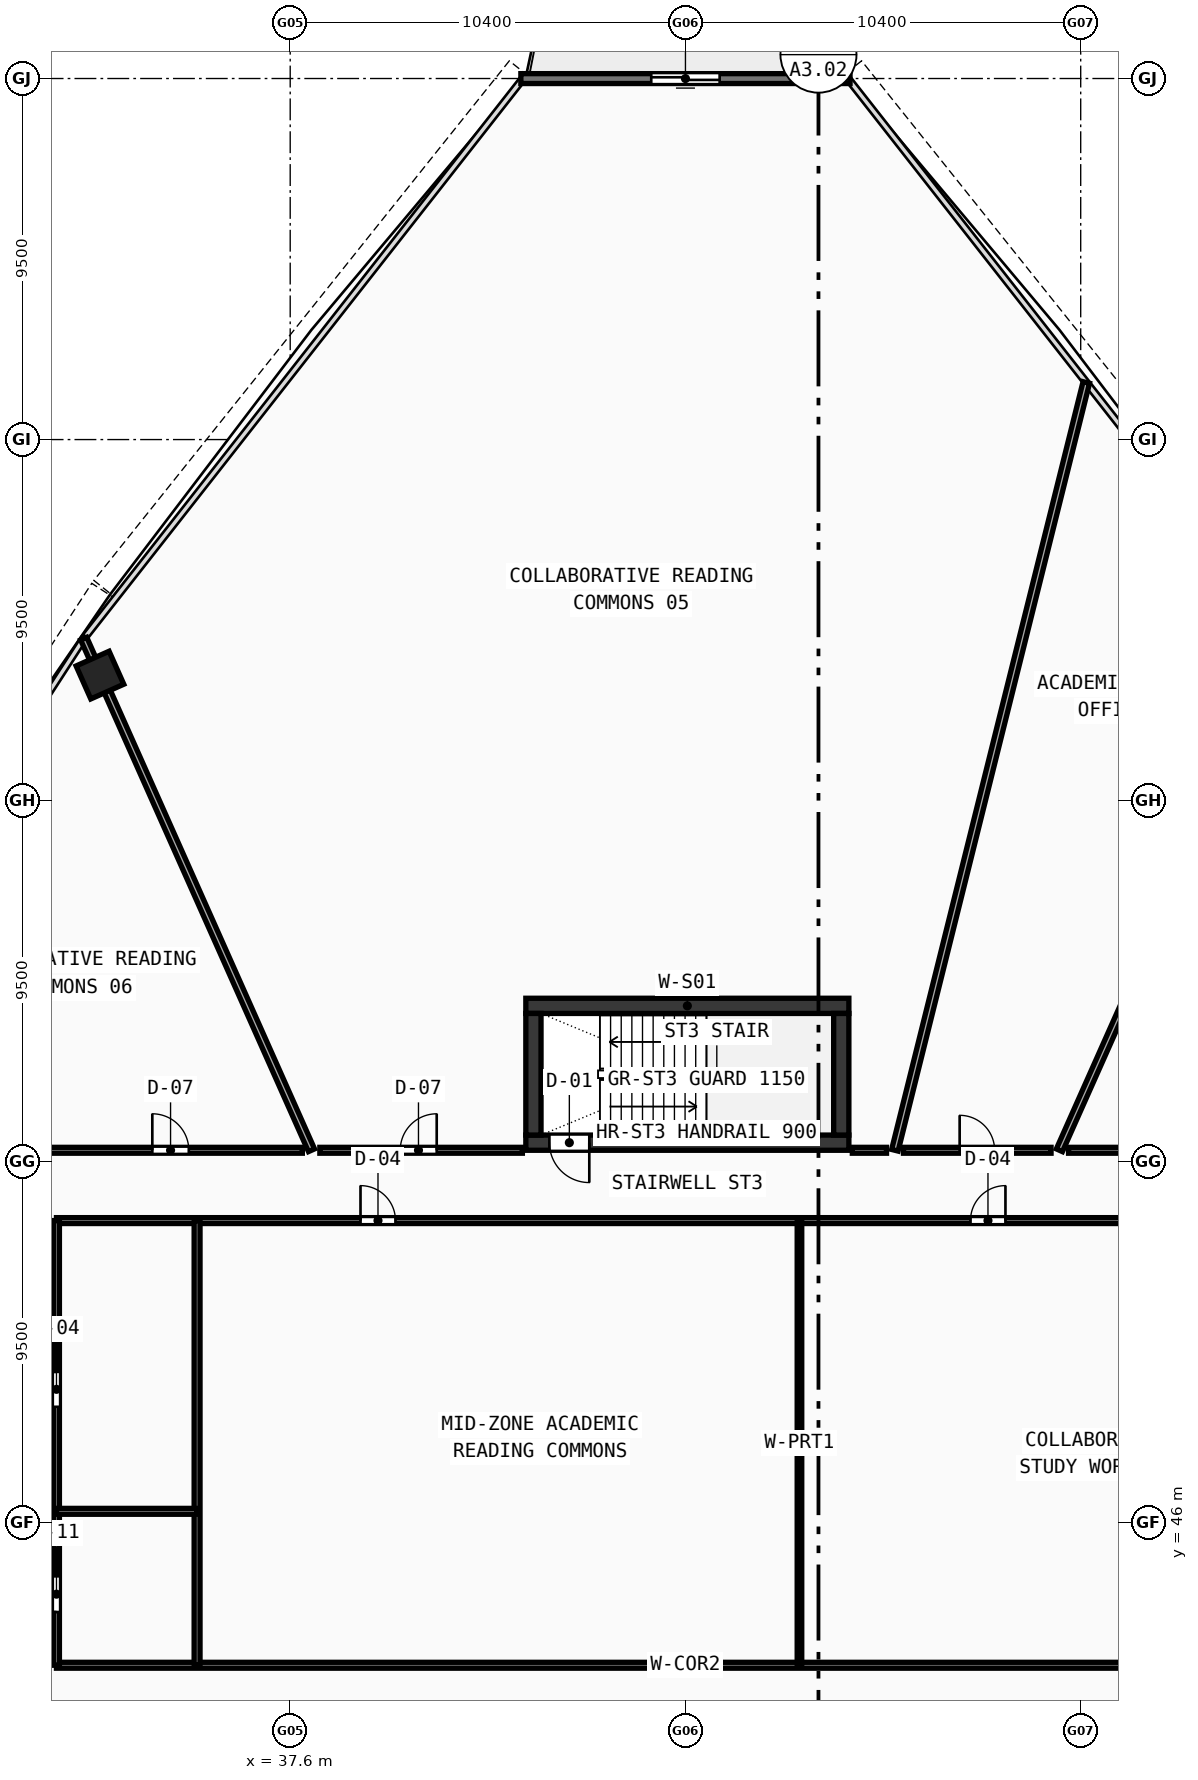
"""IFC4 building model, lengths in metres.
Left out: names, types, materials, properties, quantities, classifications, styles, units other than length and angle.
Written with IfcOpenShell. Run it as: python <this file> out.ifc"""

import sys

from ifc_helpers import new_model, si_unit, direction, frame, frame_2d, origin, origin_with_axes, origin_2d, place, context, subcontext, project, spatial, rectangle, hollow_rectangle, extrude, source, transform, mapped, element, fill, save


model = new_model("IFC4")
c1 = context("Model", 3, precision=1e-05, world=origin(), true_north=direction((0.0, 1.0)))
c2 = subcontext(c1, "Body", "Model", "MODEL_VIEW")
j1 = project(units=[si_unit("LENGTHUNIT", "METRE"), si_unit("PLANEANGLEUNIT", "RADIAN")], contexts=[c1])
p1 = place(None, origin())
s1 = spatial("IfcSite", under=j1, at=p1, CompositionType="ELEMENT")
p2 = place(p1, origin())
s2 = spatial("IfcBuilding", under=s1, at=p2, CompositionType="ELEMENT")
p3 = place(p2, frame((0.0, 0.0, 162.95)))
s3 = spatial("IfcBuildingStorey", under=s2, at=p3, CompositionType="ELEMENT", Elevation=162.95)
p4 = place(p3, frame((43.8, 59.6, 0.0), z_axis=(0.0, 0.0, 1.0), x_axis=(1.0, 0.0, 0.0)))
e1 = element("IfcWall", 1, at=p4, inside=s3, PredefinedType="SHEAR", context=c2, shape_type="SweptSolid", body=[
    extrude(rectangle(XDim=8.5, YDim=0.4, at=frame_2d((4.25, 0.0))), origin(), (0.0, 0.0, 1.0), 3.42),
])
p5 = place(p3, frame((43.8, 56.0, 0.0), z_axis=(0.0, 0.0, 1.0), x_axis=(1.0, 0.0, 0.0)))
e2 = element("IfcWall", 2, at=p5, inside=s3, PredefinedType="SHEAR", context=c2, shape_type="SweptSolid", body=[
    extrude(rectangle(XDim=8.5, YDim=0.4, at=frame_2d((4.25, 0.0))), origin(), (0.0, 0.0, 1.0), 3.42),
])
p6 = place(p5, frame((0.62, 0.0, 0.0)))
e3 = element("IfcOpeningElement", 3, at=p6, cuts=e2, PredefinedType="OPENING", context=c2, shape_type="SweptSolid", body=[
    extrude(rectangle(XDim=1.05, YDim=2.1, at=frame_2d((0.525, 1.05))), frame((0.0, 0.21, 0.0), z_axis=(0.0, -1.0, 0.0), x_axis=(1.0, 0.0, 0.0)), (0.0, 0.0, 1.0), 0.42),
])
for number, where, z_axis, x_axis in (
    (4, (44.0, 56.2, 0.0), (0.0, 0.0, 1.0), (0.0, 1.0, 0.0)),
    (5, (52.1, 56.2, 0.0), (0.0, 0.0, 1.0), (0.0, 1.0, 0.0)),
):
    element("IfcWall", number, at=place(p3, frame(where, z_axis=z_axis, x_axis=x_axis)), inside=s3, PredefinedType="SHEAR", context=c2, shape_type="SweptSolid", body=[
        extrude(rectangle(XDim=3.2, YDim=0.4, at=frame_2d((1.6, 0.0))), origin(), (0.0, 0.0, 1.0), 3.42),
    ])
m1 = source(origin(), c2, "Body", "SweptSolid", [
    extrude(hollow_rectangle(XDim=0.95, YDim=0.95, WallThickness=0.04, at=origin_2d()), origin(), (0.0, 0.0, 1.0), 3.68),
])
p7 = place(p3, frame((32.594, 68.303, -0.26), z_axis=(0.0, 0.0, 1.0), x_axis=(-0.913545457643, -0.406736643076, 0.0)))
e6 = element("IfcColumn", 6, at=p7, inside=s3, PredefinedType="COLUMN", context=c2, shape_type="MappedRepresentation", body=[
    mapped(m1, transform((0.0, 0.0, 0.0), scale=1.0)),
])
p8 = place(p3, frame((52.331, 83.998, 0.0), z_axis=(0.0, 0.0, 1.0), x_axis=(-1.0, 0.0, 0.0)))
e7 = element("IfcWall", 7, at=p8, inside=s3, PredefinedType="STANDARD", context=c2, shape_type="SweptSolid", body=[
    extrude(rectangle(XDim=8.661, YDim=0.26, at=frame_2d((4.331, 0.0))), origin(), (0.0, 0.0, 1.0), 3.42),
])
p9 = place(p8, frame((3.431, 0.0, 0.0)))
e8 = element("IfcOpeningElement", 8, at=p9, cuts=e7, PredefinedType="OPENING", context=c2, shape_type="SweptSolid", body=[
    extrude(rectangle(XDim=1.8, YDim=2.15, at=frame_2d((0.9, 1.075))), frame((0.0, 0.14, 0.0), z_axis=(0.0, -1.0, 0.0), x_axis=(1.0, 0.0, 0.0)), (0.0, 0.0, 1.0), 0.28),
])
p10 = place(p3, frame((31.45, 42.25, 0.0), z_axis=(0.0, 0.0, 1.0), x_axis=(1.0, 0.0, 0.0)))
e9 = element("IfcWall", 9, at=p10, inside=s3, PredefinedType="PARTITIONING", context=c2, shape_type="SweptSolid", body=[
    extrude(rectangle(XDim=33.1, YDim=0.155, at=frame_2d((16.55, 0.0))), origin(), (0.0, 0.0, 1.0), 2.77),
])
p11 = place(p3, frame((31.45, 53.95, 0.0), z_axis=(0.0, 0.0, 1.0), x_axis=(1.0, 0.0, 0.0)))
e10 = element("IfcWall", 10, at=p11, inside=s3, PredefinedType="PARTITIONING", context=c2, shape_type="SweptSolid", body=[
    extrude(rectangle(XDim=33.1, YDim=0.155, at=frame_2d((16.55, 0.0))), origin(), (0.0, 0.0, 1.0), 2.77),
])
p12 = place(p11, frame((8.0, 0.0, 0.0)))
e11 = element("IfcOpeningElement", 11, at=p12, cuts=e10, PredefinedType="OPENING", context=c2, shape_type="SweptSolid", body=[
    extrude(rectangle(XDim=0.92, YDim=2.1, at=frame_2d((0.46, 1.05))), frame((0.0, 0.087, 0.0), z_axis=(0.0, -1.0, 0.0), x_axis=(1.0, 0.0, 0.0)), (0.0, 0.0, 1.0), 0.175),
])
p13 = place(p11, frame((24.05, 0.0, 0.0)))
e12 = element("IfcOpeningElement", 12, at=p13, cuts=e10, PredefinedType="OPENING", context=c2, shape_type="SweptSolid", body=[
    extrude(rectangle(XDim=0.92, YDim=2.1, at=frame_2d((0.46, 1.05))), frame((0.0, 0.087, 0.0), z_axis=(0.0, -1.0, 0.0), x_axis=(1.0, 0.0, 0.0)), (0.0, 0.0, 1.0), 0.175),
])
p14 = place(p3, frame((31.45, 42.25, 0.0), z_axis=(0.0, 0.0, 1.0), x_axis=(0.0, 1.0, 0.0)))
e13 = element("IfcWall", 13, at=p14, inside=s3, PredefinedType="PARTITIONING", context=c2, shape_type="SweptSolid", body=[
    extrude(rectangle(XDim=11.7, YDim=0.155, at=frame_2d((5.85, 0.0))), origin(), (0.0, 0.0, 1.0), 2.77),
])
p15 = place(p14, frame((1.4, 0.0, 0.0)))
e14 = element("IfcOpeningElement", 14, at=p15, cuts=e13, PredefinedType="OPENING", context=c2, shape_type="SweptSolid", body=[
    extrude(rectangle(XDim=0.94, YDim=2.1, at=frame_2d((0.47, 1.05))), frame((0.0, 0.087, 0.0), z_axis=(0.0, -1.0, 0.0), x_axis=(1.0, 0.0, 0.0)), (0.0, 0.0, 1.0), 0.175),
])
p16 = place(p14, frame((6.8, 0.0, 0.0)))
e15 = element("IfcOpeningElement", 15, at=p16, cuts=e13, PredefinedType="OPENING", context=c2, shape_type="SweptSolid", body=[
    extrude(rectangle(XDim=0.92, YDim=2.1, at=frame_2d((0.46, 1.05))), frame((0.0, 0.087, 0.0), z_axis=(0.0, -1.0, 0.0), x_axis=(1.0, 0.0, 0.0)), (0.0, 0.0, 1.0), 0.175),
])
p17 = place(p3, frame((35.15, 42.25, 0.0), z_axis=(0.0, 0.0, 1.0), x_axis=(0.0, 1.0, 0.0)))
e16 = element("IfcWall", 16, at=p17, inside=s3, PredefinedType="PARTITIONING", context=c2, shape_type="SweptSolid", body=[
    extrude(rectangle(XDim=11.7, YDim=0.155, at=frame_2d((5.85, 0.0))), origin(), (0.0, 0.0, 1.0), 2.77),
])
p18 = place(p3, frame((31.45, 46.3, 0.0), z_axis=(0.0, 0.0, 1.0), x_axis=(1.0, 0.0, 0.0)))
e17 = element("IfcWall", 17, at=p18, inside=s3, PredefinedType="PARTITIONING", context=c2, shape_type="SweptSolid", body=[
    extrude(rectangle(XDim=3.7, YDim=0.155, at=frame_2d((1.85, 0.0))), origin(), (0.0, 0.0, 1.0), 2.77),
])
p19 = place(p3, frame((51.0, 42.25, 0.0), z_axis=(0.0, 0.0, 1.0), x_axis=(0.0, 1.0, 0.0)))
e18 = element("IfcWall", 18, at=p19, inside=s3, PredefinedType="PARTITIONING", context=c2, shape_type="SweptSolid", body=[
    extrude(rectangle(XDim=11.7, YDim=0.12, at=frame_2d((5.85, 0.0))), origin(), (0.0, 0.0, 1.0), 3.02),
])
p20 = place(p3, frame((57.84, 55.8, 0.0), z_axis=(0.0, 0.0, 1.0), x_axis=(0.406737891531, 0.913544901793, 0.0)))
e19 = element("IfcWall", 19, at=p20, inside=s3, PredefinedType="PARTITIONING", context=c2, shape_type="SweptSolid", body=[
    extrude(rectangle(XDim=14.736, YDim=0.175, at=frame_2d((7.368, 0.0))), origin(), (0.0, 0.0, 1.0), 2.77),
])
p21 = place(p3, frame((53.51, 55.8, 0.0), z_axis=(0.0, 0.0, 1.0), x_axis=(0.241934095485, 0.970292684422, 0.0)))
e20 = element("IfcWall", 20, at=p21, inside=s3, PredefinedType="PARTITIONING", context=c2, shape_type="SweptSolid", body=[
    extrude(rectangle(XDim=20.82, YDim=0.175, at=frame_2d((10.41, 0.0))), origin(), (0.0, 0.0, 1.0), 2.77),
])
p22 = place(p3, frame((38.16, 55.8, 0.0), z_axis=(0.0, 0.0, 1.0), x_axis=(-0.406737891531, 0.913544901793, 0.0)))
e21 = element("IfcWall", 21, at=p22, inside=s3, PredefinedType="PARTITIONING", context=c2, shape_type="SweptSolid", body=[
    extrude(rectangle(XDim=14.736, YDim=0.175, at=frame_2d((7.368, 0.0))), origin(), (0.0, 0.0, 1.0), 2.77),
])
p23 = place(p3, frame((30.953, 55.8, 0.0), z_axis=(0.0, 0.0, 1.0), x_axis=(1.0, 0.0, 0.0)))
e22 = element("IfcWall", 22, at=p23, inside=s3, PredefinedType="PARTITIONING", context=c2, shape_type="SweptSolid", body=[
    extrude(rectangle(XDim=6.966, YDim=0.155, at=frame_2d((3.483, 0.0))), origin(), (0.0, 0.0, 1.0), 3.02),
])
p24 = place(p23, frame((3.019, 0.0, 0.0)))
e23 = element("IfcOpeningElement", 23, at=p24, cuts=e22, PredefinedType="OPENING", context=c2, shape_type="SweptSolid", body=[
    extrude(rectangle(XDim=0.96, YDim=2.12, at=frame_2d((0.48, 1.06))), frame((0.0, 0.087, 0.0), z_axis=(0.0, -1.0, 0.0), x_axis=(1.0, 0.0, 0.0)), (0.0, 0.0, 1.0), 0.175),
])
p25 = place(p3, frame((38.38, 55.8, 0.0), z_axis=(0.0, 0.0, 1.0), x_axis=(1.0, 0.0, 0.0)))
e24 = element("IfcWall", 24, at=p25, inside=s3, PredefinedType="PARTITIONING", context=c2, shape_type="SweptSolid", body=[
    extrude(rectangle(XDim=5.329, YDim=0.155, at=frame_2d((2.665, 0.0))), origin(), (0.0, 0.0, 1.0), 2.77),
])
p26 = place(p25, frame((2.115, 0.0, 0.0)))
e25 = element("IfcOpeningElement", 25, at=p26, cuts=e24, PredefinedType="OPENING", context=c2, shape_type="SweptSolid", body=[
    extrude(rectangle(XDim=0.96, YDim=2.12, at=frame_2d((0.48, 1.06))), frame((0.0, 0.087, 0.0), z_axis=(0.0, -1.0, 0.0), x_axis=(1.0, 0.0, 0.0)), (0.0, 0.0, 1.0), 0.175),
])
p27 = place(p3, frame((52.391, 55.8, 0.0), z_axis=(0.0, 0.0, 1.0), x_axis=(1.0, 0.0, 0.0)))
e26 = element("IfcWall", 26, at=p27, inside=s3, PredefinedType="PARTITIONING", context=c2, shape_type="SweptSolid", body=[
    extrude(rectangle(XDim=0.899, YDim=0.155, at=frame_2d((0.45, 0.0))), origin(), (0.0, 0.0, 1.0), 3.42),
])
p28 = place(p3, frame((53.737, 55.8, 0.0), z_axis=(0.0, 0.0, 1.0), x_axis=(1.0, 0.0, 0.0)))
e27 = element("IfcWall", 27, at=p28, inside=s3, PredefinedType="PARTITIONING", context=c2, shape_type="SweptSolid", body=[
    extrude(rectangle(XDim=3.883, YDim=0.155, at=frame_2d((1.941, 0.0))), origin(), (0.0, 0.0, 1.0), 2.77),
])
p29 = place(p28, frame((1.478, 0.0, 0.0)))
e28 = element("IfcOpeningElement", 28, at=p29, cuts=e27, PredefinedType="OPENING", context=c2, shape_type="SweptSolid", body=[
    extrude(rectangle(XDim=0.92, YDim=2.1, at=frame_2d((0.46, 1.05))), frame((0.0, 0.087, 0.0), z_axis=(0.0, -1.0, 0.0), x_axis=(1.0, 0.0, 0.0)), (0.0, 0.0, 1.0), 0.175),
])
p30 = place(p3, frame((58.08, 55.8, 0.0), z_axis=(0.0, 0.0, 1.0), x_axis=(1.0, 0.0, 0.0)))
e29 = element("IfcWall", 29, at=p30, inside=s3, PredefinedType="PARTITIONING", context=c2, shape_type="SweptSolid", body=[
    extrude(rectangle(XDim=8.32, YDim=0.155, at=frame_2d((4.16, 0.0))), origin(), (0.0, 0.0, 1.0), 3.02),
])
p31 = place(p30, frame((3.809, 0.0, 0.0)))
e30 = element("IfcOpeningElement", 30, at=p31, cuts=e29, PredefinedType="OPENING", context=c2, shape_type="SweptSolid", body=[
    extrude(rectangle(XDim=0.92, YDim=2.1, at=frame_2d((0.46, 1.05))), frame((0.0, 0.087, 0.0), z_axis=(0.0, -1.0, 0.0), x_axis=(1.0, 0.0, 0.0)), (0.0, 0.0, 1.0), 0.175),
])
m2 = source(origin(), c2, "Body", "SweptSolid", [
    extrude(rectangle(XDim=1.8, YDim=2.15, at=frame_2d((0.9, 1.075))), frame((0.0, 0.025, 0.0), z_axis=(0.0, -1.0, 0.0), x_axis=(1.0, 0.0, 0.0)), (0.0, 0.0, 1.0), 0.05),
])
p32 = place(p9, origin_with_axes())
e31 = element("IfcDoor", 31, at=p32, inside=s3, OperationType="DOUBLE_DOOR_SLIDING", PredefinedType="DOOR", context=c2, shape_type="MappedRepresentation", body=[
    mapped(m2, transform((0.0, 0.0, 0.0), scale=1.0)),
])
fill(e8, e31)
m3 = source(origin(), c2, "Body", "SweptSolid", [
    extrude(rectangle(XDim=1.05, YDim=2.1, at=frame_2d((0.525, 1.05))), frame((0.0, 0.025, 0.0), z_axis=(0.0, -1.0, 0.0), x_axis=(1.0, 0.0, 0.0)), (0.0, 0.0, 1.0), 0.05),
])
p33 = place(p6, frame((1.05, 0.0, 0.0), z_axis=(0.0, 0.0, 1.0), x_axis=(-1.0, 0.0, 0.0)))
e32 = element("IfcDoor", 32, at=p33, inside=s3, OperationType="SINGLE_SWING_LEFT", PredefinedType="DOOR", context=c2, shape_type="MappedRepresentation", body=[
    mapped(m3, transform((0.0, 0.0, 0.0), scale=1.0)),
])
fill(e3, e32)
m4 = source(origin(), c2, "Body", "SweptSolid", [
    extrude(rectangle(XDim=0.94, YDim=2.1, at=frame_2d((0.47, 1.05))), frame((0.0, 0.025, 0.0), z_axis=(0.0, -1.0, 0.0), x_axis=(1.0, 0.0, 0.0)), (0.0, 0.0, 1.0), 0.05),
])
p34 = place(p15, origin_with_axes())
e33 = element("IfcDoor", 33, at=p34, inside=s3, OperationType="SINGLE_SWING_LEFT", PredefinedType="DOOR", context=c2, shape_type="MappedRepresentation", body=[
    mapped(m4, transform((0.0, 0.0, 0.0), scale=1.0)),
])
fill(e14, e33)
m5 = source(origin(), c2, "Body", "SweptSolid", [
    extrude(rectangle(XDim=0.92, YDim=2.1, at=frame_2d((0.46, 1.05))), frame((0.0, 0.025, 0.0), z_axis=(0.0, -1.0, 0.0), x_axis=(1.0, 0.0, 0.0)), (0.0, 0.0, 1.0), 0.05),
])
p35 = place(p16, origin_with_axes())
e34 = element("IfcDoor", 34, at=p35, inside=s3, OperationType="SINGLE_SWING_RIGHT", PredefinedType="DOOR", context=c2, shape_type="MappedRepresentation", body=[
    mapped(m5, transform((0.0, 0.0, 0.0), scale=1.0)),
])
fill(e15, e34)
p36 = place(p12, origin_with_axes())
e35 = element("IfcDoor", 35, at=p36, inside=s3, OperationType="SINGLE_SWING_LEFT", PredefinedType="DOOR", context=c2, shape_type="MappedRepresentation", body=[
    mapped(m5, transform((0.0, 0.0, 0.0), scale=1.0)),
])
fill(e11, e35)
p37 = place(p13, origin_with_axes())
e36 = element("IfcDoor", 36, at=p37, inside=s3, OperationType="SINGLE_SWING_RIGHT", PredefinedType="DOOR", context=c2, shape_type="MappedRepresentation", body=[
    mapped(m5, transform((0.0, 0.0, 0.0), scale=1.0)),
])
fill(e12, e36)
p38 = place(p29, origin_with_axes())
e37 = element("IfcDoor", 37, at=p38, inside=s3, OperationType="SINGLE_SWING_LEFT", PredefinedType="DOOR", context=c2, shape_type="MappedRepresentation", body=[
    mapped(m5, transform((0.0, 0.0, 0.0), scale=1.0)),
])
fill(e28, e37)
m6 = source(origin(), c2, "Body", "SweptSolid", [
    extrude(rectangle(XDim=0.96, YDim=2.12, at=frame_2d((0.48, 1.06))), frame((0.0, 0.025, 0.0), z_axis=(0.0, -1.0, 0.0), x_axis=(1.0, 0.0, 0.0)), (0.0, 0.0, 1.0), 0.05),
])
p39 = place(p26, origin_with_axes())
e38 = element("IfcDoor", 38, at=p39, inside=s3, OperationType="SINGLE_SWING_RIGHT", PredefinedType="DOOR", context=c2, shape_type="MappedRepresentation", body=[
    mapped(m6, transform((0.0, 0.0, 0.0), scale=1.0)),
])
fill(e25, e38)
p40 = place(p24, origin_with_axes())
e39 = element("IfcDoor", 39, at=p40, inside=s3, OperationType="SINGLE_SWING_LEFT", PredefinedType="DOOR", context=c2, shape_type="MappedRepresentation", body=[
    mapped(m6, transform((0.0, 0.0, 0.0), scale=1.0)),
])
fill(e23, e39)
save(model, sys.argv[1])
